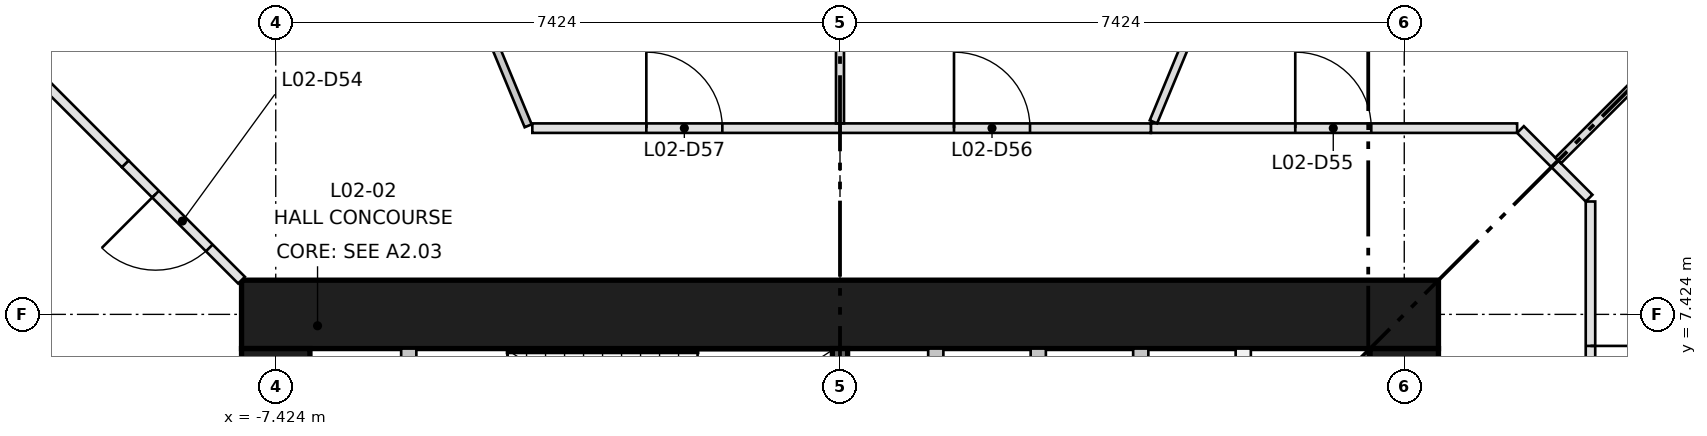
"""IFC4 building model, lengths in metres.
Left out: names, types, materials, properties, quantities, classifications, styles, units other than length and angle.
Written with IfcOpenShell. Run it as: python <this file> out.ifc"""

import sys

from ifc_helpers import new_model, si_unit, direction, frame, frame_2d, origin, place, context, subcontext, project, spatial, rectangle, extrude, element, fill, save


model = new_model("IFC4")
c1 = context("Model", 3, precision=1e-05, world=origin(), true_north=direction((0.0, 1.0)))
c2 = subcontext(c1, "Body", "Model", "MODEL_VIEW")
j1 = project(units=[si_unit("LENGTHUNIT", "METRE"), si_unit("PLANEANGLEUNIT", "RADIAN")], contexts=[c1])
p1 = place(None, origin())
s1 = spatial("IfcSite", under=j1, at=p1, CompositionType="ELEMENT")
p2 = place(p1, origin())
s2 = spatial("IfcBuilding", under=s1, at=p2, CompositionType="ELEMENT")
p3 = place(p2, frame((0.0, 0.0, 9.9)))
s3 = spatial("IfcBuildingStorey", under=s2, at=p3, CompositionType="ELEMENT", Elevation=9.9)
p4 = place(p3, frame((-7.874, 7.424, 0.0), z_axis=(0.0, 0.0, 1.0), x_axis=(1.0, 0.0, 0.0)))
e1 = element("IfcWall", 1, at=p4, inside=s3, PredefinedType="SHEAR", context=c2, shape_type="SweptSolid", body=[
    extrude(rectangle(XDim=15.748, YDim=0.9, at=frame_2d((7.874, 0.0))), origin(), (0.0, 0.0, 1.0), 4.5),
])
p5 = place(p3, frame((-7.424, -6.974, 0.0), z_axis=(0.0, 0.0, 1.0), x_axis=(0.0, 1.0, 0.0)))
e2 = element("IfcWall", 2, at=p5, inside=s3, PredefinedType="SHEAR", context=c2, shape_type="SweptSolid", body=[
    extrude(rectangle(XDim=13.948, YDim=0.9, at=frame_2d((6.974, 0.0))), origin(), (0.0, 0.0, 1.0), 4.5),
])
p6 = place(p5, frame((6.474, 0.0, 0.0)))
e3 = element("IfcOpeningElement", 3, at=p6, cuts=e2, PredefinedType="OPENING", context=c2, shape_type="SweptSolid", body=[
    extrude(rectangle(XDim=1.0, YDim=2.1, at=frame_2d((0.5, 1.05))), frame((0.0, 0.46, 0.0), z_axis=(0.0, -1.0, 0.0), x_axis=(1.0, 0.0, 0.0)), (0.0, 0.0, 1.0), 0.92),
])
p7 = place(p5, frame((3.35, 0.0, 0.0)))
e4 = element("IfcOpeningElement", 4, at=p7, cuts=e2, PredefinedType="OPENING", context=c2, shape_type="SweptSolid", body=[
    extrude(rectangle(XDim=1.8, YDim=2.1, at=frame_2d((0.9, 1.05))), frame((0.0, 0.46, 0.0), z_axis=(0.0, -1.0, 0.0), x_axis=(1.0, 0.0, 0.0)), (0.0, 0.0, 1.0), 0.92),
])
p8 = place(p5, frame((8.799, 0.0, 0.0)))
e5 = element("IfcOpeningElement", 5, at=p8, cuts=e2, PredefinedType="OPENING", context=c2, shape_type="SweptSolid", body=[
    extrude(rectangle(XDim=1.8, YDim=2.1, at=frame_2d((0.9, 1.05))), frame((0.0, 0.46, 0.0), z_axis=(0.0, -1.0, 0.0), x_axis=(1.0, 0.0, 0.0)), (0.0, 0.0, 1.0), 0.92),
])
p9 = place(p5, frame((11.974, 0.0, 0.0)))
e6 = element("IfcOpeningElement", 6, at=p9, cuts=e2, PredefinedType="OPENING", context=c2, shape_type="SweptSolid", body=[
    extrude(rectangle(XDim=1.0, YDim=2.1, at=frame_2d((0.5, 1.05))), frame((0.0, 0.46, 0.0), z_axis=(0.0, -1.0, 0.0), x_axis=(1.0, 0.0, 0.0)), (0.0, 0.0, 1.0), 0.92),
])
p10 = place(p3, frame((7.424, -6.974, 0.0), z_axis=(0.0, 0.0, 1.0), x_axis=(0.0, 1.0, 0.0)))
e7 = element("IfcWall", 7, at=p10, inside=s3, PredefinedType="SHEAR", context=c2, shape_type="SweptSolid", body=[
    extrude(rectangle(XDim=13.948, YDim=0.9, at=frame_2d((6.974, 0.0))), origin(), (0.0, 0.0, 1.0), 4.5),
])
p11 = place(p10, frame((6.474, 0.0, 0.0)))
e8 = element("IfcOpeningElement", 8, at=p11, cuts=e7, PredefinedType="OPENING", context=c2, shape_type="SweptSolid", body=[
    extrude(rectangle(XDim=1.0, YDim=2.1, at=frame_2d((0.5, 1.05))), frame((0.0, 0.46, 0.0), z_axis=(0.0, -1.0, 0.0), x_axis=(1.0, 0.0, 0.0)), (0.0, 0.0, 1.0), 0.92),
])
p12 = place(p10, frame((3.35, 0.0, 0.0)))
e9 = element("IfcOpeningElement", 9, at=p12, cuts=e7, PredefinedType="OPENING", context=c2, shape_type="SweptSolid", body=[
    extrude(rectangle(XDim=1.8, YDim=2.1, at=frame_2d((0.9, 1.05))), frame((0.0, 0.46, 0.0), z_axis=(0.0, -1.0, 0.0), x_axis=(1.0, 0.0, 0.0)), (0.0, 0.0, 1.0), 0.92),
])
p13 = place(p10, frame((8.799, 0.0, 0.0)))
e10 = element("IfcOpeningElement", 10, at=p13, cuts=e7, PredefinedType="OPENING", context=c2, shape_type="SweptSolid", body=[
    extrude(rectangle(XDim=1.8, YDim=2.1, at=frame_2d((0.9, 1.05))), frame((0.0, 0.46, 0.0), z_axis=(0.0, -1.0, 0.0), x_axis=(1.0, 0.0, 0.0)), (0.0, 0.0, 1.0), 0.92),
])
p14 = place(p3, frame((0.0, 5.574, 0.0), z_axis=(0.0, 0.0, 1.0), x_axis=(0.0, 1.0, 0.0)))
e11 = element("IfcWall", 11, at=p14, inside=s3, PredefinedType="SHEAR", context=c2, shape_type="SweptSolid", body=[
    extrude(rectangle(XDim=1.4, YDim=0.2, at=frame_2d((0.7, 0.0))), origin(), (0.0, 0.0, 1.0), 4.1),
])
for number, where, z_axis, x_axis in (
    (12, (1.26, 4.174, 0.0), (0.0, 0.0, 1.0), (0.0, 1.0, 0.0)),
    (13, (2.609, 4.174, 0.0), (0.0, 0.0, 1.0), (0.0, 1.0, 0.0)),
    (14, (3.957, 4.174, 0.0), (0.0, 0.0, 1.0), (0.0, 1.0, 0.0)),
    (15, (5.305, 4.174, 0.0), (0.0, 0.0, 1.0), (0.0, 1.0, 0.0)),
):
    element("IfcWall", number, at=place(p3, frame(where, z_axis=z_axis, x_axis=x_axis)), inside=s3, PredefinedType="PARTITIONING", context=c2, shape_type="SweptSolid", body=[
        extrude(rectangle(XDim=2.8, YDim=0.2, at=frame_2d((1.4, 0.0))), origin(), (0.0, 0.0, 1.0), 4.1),
    ])
p15 = place(p3, frame((-5.674, 4.174, 0.0), z_axis=(0.0, 0.0, 1.0), x_axis=(0.0, 1.0, 0.0)))
e16 = element("IfcWall", 16, at=p15, inside=s3, PredefinedType="PARTITIONING", context=c2, shape_type="SweptSolid", body=[
    extrude(rectangle(XDim=2.8, YDim=0.2, at=frame_2d((1.4, 0.0))), origin(), (0.0, 0.0, 1.0), 4.1),
])
p16 = place(p15, frame((0.125, 0.0, 0.0)))
e17 = element("IfcOpeningElement", 17, at=p16, cuts=e16, PredefinedType="OPENING", context=c2, shape_type="SweptSolid", body=[
    extrude(rectangle(XDim=0.95, YDim=2.1, at=frame_2d((0.475, 1.05))), frame((0.0, 0.11, 0.0), z_axis=(0.0, -1.0, 0.0), x_axis=(1.0, 0.0, 0.0)), (0.0, 0.0, 1.0), 0.22),
])
p17 = place(p15, frame((1.725, 0.0, 0.0)))
e18 = element("IfcOpeningElement", 18, at=p17, cuts=e16, PredefinedType="OPENING", context=c2, shape_type="SweptSolid", body=[
    extrude(rectangle(XDim=0.95, YDim=2.1, at=frame_2d((0.475, 1.05))), frame((0.0, 0.11, 0.0), z_axis=(0.0, -1.0, 0.0), x_axis=(1.0, 0.0, 0.0)), (0.0, 0.0, 1.0), 0.22),
])
p18 = place(p3, frame((9.405, 9.405, 0.0), z_axis=(0.0, 0.0, 1.0), x_axis=(0.707106781187, -0.707106781187, 0.0)))
e19 = element("IfcWall", 19, at=p18, inside=s3, PredefinedType="PARTITIONING", context=c2, shape_type="SweptSolid", body=[
    extrude(rectangle(XDim=0.638, YDim=0.125, at=frame_2d((0.319, 0.0))), origin(), (0.0, 0.0, 1.0), 4.1),
])
p19 = place(p3, frame((9.874, 8.909, 0.0), z_axis=(0.0, 0.0, 1.0), x_axis=(0.0, -1.0, 0.0)))
e20 = element("IfcWall", 20, at=p19, inside=s3, PredefinedType="PARTITIONING", context=c2, shape_type="SweptSolid", body=[
    extrude(rectangle(XDim=4.819, YDim=0.125, at=frame_2d((2.41, 0.0))), origin(), (0.0, 0.0, 1.0), 4.1),
])
p20 = place(p19, frame((1.9, 0.0, 0.0)))
e21 = element("IfcOpeningElement", 21, at=p20, cuts=e20, PredefinedType="OPENING", context=c2, shape_type="SweptSolid", body=[
    extrude(rectangle(XDim=1.0, YDim=2.1, at=frame_2d((0.5, 1.05))), frame((0.0, 0.073, 0.0), z_axis=(0.0, -1.0, 0.0), x_axis=(1.0, 0.0, 0.0)), (0.0, 0.0, 1.0), 0.145),
])
p21 = place(p3, frame((-7.874, 7.874, 0.0), z_axis=(0.0, 0.0, 1.0), x_axis=(-0.707106781187, 0.707106781187, 0.0)))
e22 = element("IfcWall", 22, at=p21, inside=s3, PredefinedType="PARTITIONING", context=c2, shape_type="SweptSolid", body=[
    extrude(rectangle(XDim=2.165, YDim=0.125, at=frame_2d((1.082, 0.0))), origin(), (0.0, 0.0, 1.0), 4.1),
])
p22 = place(p21, frame((0.6, 0.0, 0.0)))
e23 = element("IfcOpeningElement", 23, at=p22, cuts=e22, PredefinedType="OPENING", context=c2, shape_type="SweptSolid", body=[
    extrude(rectangle(XDim=1.0, YDim=2.1, at=frame_2d((0.5, 1.05))), frame((0.0, 0.073, 0.0), z_axis=(0.0, -1.0, 0.0), x_axis=(1.0, 0.0, 0.0)), (0.0, 0.0, 1.0), 0.145),
])
p23 = place(p3, frame((4.09, 9.874, 0.0), z_axis=(0.0, 0.0, 1.0), x_axis=(1.0, 0.0, 0.0)))
e24 = element("IfcWall", 24, at=p23, inside=s3, PredefinedType="PARTITIONING", context=c2, shape_type="SweptSolid", body=[
    extrude(rectangle(XDim=4.819, YDim=0.125, at=frame_2d((2.41, 0.0))), origin(), (0.0, 0.0, 1.0), 4.1),
])
p24 = place(p23, frame((1.9, 0.0, 0.0)))
e25 = element("IfcOpeningElement", 25, at=p24, cuts=e24, PredefinedType="OPENING", context=c2, shape_type="SweptSolid", body=[
    extrude(rectangle(XDim=1.0, YDim=2.1, at=frame_2d((0.5, 1.05))), frame((0.0, 0.073, 0.0), z_axis=(0.0, -1.0, 0.0), x_axis=(1.0, 0.0, 0.0)), (0.0, 0.0, 1.0), 0.145),
])
p25 = place(p3, frame((8.953, 9.856, 0.0), z_axis=(0.0, 0.0, 1.0), x_axis=(0.707106781187, -0.707106781187, 0.0)))
e26 = element("IfcWall", 26, at=p25, inside=s3, PredefinedType="PARTITIONING", context=c2, shape_type="SweptSolid", body=[
    extrude(rectangle(XDim=0.638, YDim=0.125, at=frame_2d((0.319, 0.0))), origin(), (0.0, 0.0, 1.0), 4.1),
])
p26 = place(p3, frame((0.0, 9.874, 0.0), z_axis=(0.0, 0.0, 1.0), x_axis=(1.0, 0.0, 0.0)))
e27 = element("IfcWall", 27, at=p26, inside=s3, PredefinedType="PARTITIONING", context=c2, shape_type="SweptSolid", body=[
    extrude(rectangle(XDim=4.09, YDim=0.125, at=frame_2d((2.045, 0.0))), origin(), (0.0, 0.0, 1.0), 4.1),
])
p27 = place(p26, frame((1.5, 0.0, 0.0)))
e28 = element("IfcOpeningElement", 28, at=p27, cuts=e27, PredefinedType="OPENING", context=c2, shape_type="SweptSolid", body=[
    extrude(rectangle(XDim=1.0, YDim=2.1, at=frame_2d((0.5, 1.05))), frame((0.0, 0.073, 0.0), z_axis=(0.0, -1.0, 0.0), x_axis=(1.0, 0.0, 0.0)), (0.0, 0.0, 1.0), 0.145),
])
p28 = place(p3, frame((-4.048, 9.874, 0.0), z_axis=(0.0, 0.0, 1.0), x_axis=(1.0, 0.0, 0.0)))
e29 = element("IfcWall", 29, at=p28, inside=s3, PredefinedType="PARTITIONING", context=c2, shape_type="SweptSolid", body=[
    extrude(rectangle(XDim=4.048, YDim=0.125, at=frame_2d((2.024, 0.0))), origin(), (0.0, 0.0, 1.0), 4.1),
])
p29 = place(p28, frame((1.5, 0.0, 0.0)))
e30 = element("IfcOpeningElement", 30, at=p29, cuts=e29, PredefinedType="OPENING", context=c2, shape_type="SweptSolid", body=[
    extrude(rectangle(XDim=1.0, YDim=2.1, at=frame_2d((0.5, 1.05))), frame((0.0, 0.073, 0.0), z_axis=(0.0, -1.0, 0.0), x_axis=(1.0, 0.0, 0.0)), (0.0, 0.0, 1.0), 0.145),
])
p30 = place(p3, frame((13.216, 13.216, 0.0), z_axis=(0.0, 0.0, 1.0), x_axis=(-0.707106781187, -0.707106781187, 0.0)))
e31 = element("IfcWall", 31, at=p30, inside=s3, PredefinedType="PARTITIONING", context=c2, shape_type="SweptSolid", body=[
    extrude(rectangle(XDim=5.327, YDim=0.105, at=frame_2d((2.664, 0.0))), origin(), (0.0, 0.0, 1.0), 4.1),
])
p31 = place(p3, frame((4.124, 9.957, 0.0), z_axis=(0.0, 0.0, 1.0), x_axis=(0.382702629741, 0.923871580464, 0.0)))
e32 = element("IfcWall", 32, at=p31, inside=s3, PredefinedType="PARTITIONING", context=c2, shape_type="SweptSolid", body=[
    extrude(rectangle(XDim=4.343, YDim=0.105, at=frame_2d((2.171, 0.0))), origin(), (0.0, 0.0, 1.0), 4.1),
])
p32 = place(p3, frame((0.0, 9.937, 0.0), z_axis=(0.0, 0.0, 1.0), x_axis=(0.0, 1.0, 0.0)))
e33 = element("IfcWall", 33, at=p32, inside=s3, PredefinedType="PARTITIONING", context=c2, shape_type="SweptSolid", body=[
    extrude(rectangle(XDim=5.184, YDim=0.105, at=frame_2d((2.592, 0.0))), origin(), (0.0, 0.0, 1.0), 4.1),
])
p33 = place(p3, frame((-4.103, 9.905, 0.0), z_axis=(0.0, 0.0, 1.0), x_axis=(-0.38266385981, 0.923887639486, 0.0)))
e34 = element("IfcWall", 34, at=p33, inside=s3, PredefinedType="PARTITIONING", context=c2, shape_type="SweptSolid", body=[
    extrude(rectangle(XDim=4.399, YDim=0.1, at=frame_2d((2.199, 0.0))), origin(), (0.0, 0.0, 1.0), 4.1),
])
p34 = place(p3, frame((-9.405, 9.405, 0.0), z_axis=(0.0, 0.0, 1.0), x_axis=(-0.707106781187, 0.707106781187, 0.0)))
e35 = element("IfcWall", 35, at=p34, inside=s3, PredefinedType="PARTITIONING", context=c2, shape_type="SweptSolid", body=[
    extrude(rectangle(XDim=5.39, YDim=0.125, at=frame_2d((2.695, 0.0))), origin(), (0.0, 0.0, 1.0), 4.1),
])
p35 = place(p20, origin())
e36 = element("IfcDoor", 36, at=p35, inside=s3, OperationType="SINGLE_SWING_LEFT", PredefinedType="DOOR", context=c2, shape_type="SweptSolid", body=[
    extrude(rectangle(XDim=1.0, YDim=2.1, at=frame_2d((0.5, 1.05))), frame((0.0, 0.025, 0.0), z_axis=(0.0, -1.0, 0.0), x_axis=(1.0, 0.0, 0.0)), (0.0, 0.0, 1.0), 0.05),
])
fill(e21, e36)
p36 = place(p22, origin())
e37 = element("IfcDoor", 37, at=p36, inside=s3, OperationType="SINGLE_SWING_RIGHT", PredefinedType="DOOR", context=c2, shape_type="SweptSolid", body=[
    extrude(rectangle(XDim=1.0, YDim=2.1, at=frame_2d((0.5, 1.05))), frame((0.0, 0.025, 0.0), z_axis=(0.0, -1.0, 0.0), x_axis=(1.0, 0.0, 0.0)), (0.0, 0.0, 1.0), 0.05),
])
fill(e23, e37)
p37 = place(p24, origin())
e38 = element("IfcDoor", 38, at=p37, inside=s3, OperationType="SINGLE_SWING_LEFT", PredefinedType="DOOR", context=c2, shape_type="SweptSolid", body=[
    extrude(rectangle(XDim=1.0, YDim=2.1, at=frame_2d((0.5, 1.05))), frame((0.0, 0.025, 0.0), z_axis=(0.0, -1.0, 0.0), x_axis=(1.0, 0.0, 0.0)), (0.0, 0.0, 1.0), 0.05),
])
fill(e25, e38)
p38 = place(p27, origin())
e39 = element("IfcDoor", 39, at=p38, inside=s3, OperationType="SINGLE_SWING_LEFT", PredefinedType="DOOR", context=c2, shape_type="SweptSolid", body=[
    extrude(rectangle(XDim=1.0, YDim=2.1, at=frame_2d((0.5, 1.05))), frame((0.0, 0.025, 0.0), z_axis=(0.0, -1.0, 0.0), x_axis=(1.0, 0.0, 0.0)), (0.0, 0.0, 1.0), 0.05),
])
fill(e28, e39)
p39 = place(p29, origin())
e40 = element("IfcDoor", 40, at=p39, inside=s3, OperationType="SINGLE_SWING_LEFT", PredefinedType="DOOR", context=c2, shape_type="SweptSolid", body=[
    extrude(rectangle(XDim=1.0, YDim=2.1, at=frame_2d((0.5, 1.05))), frame((0.0, 0.025, 0.0), z_axis=(0.0, -1.0, 0.0), x_axis=(1.0, 0.0, 0.0)), (0.0, 0.0, 1.0), 0.05),
])
fill(e30, e40)
save(model, sys.argv[1])
